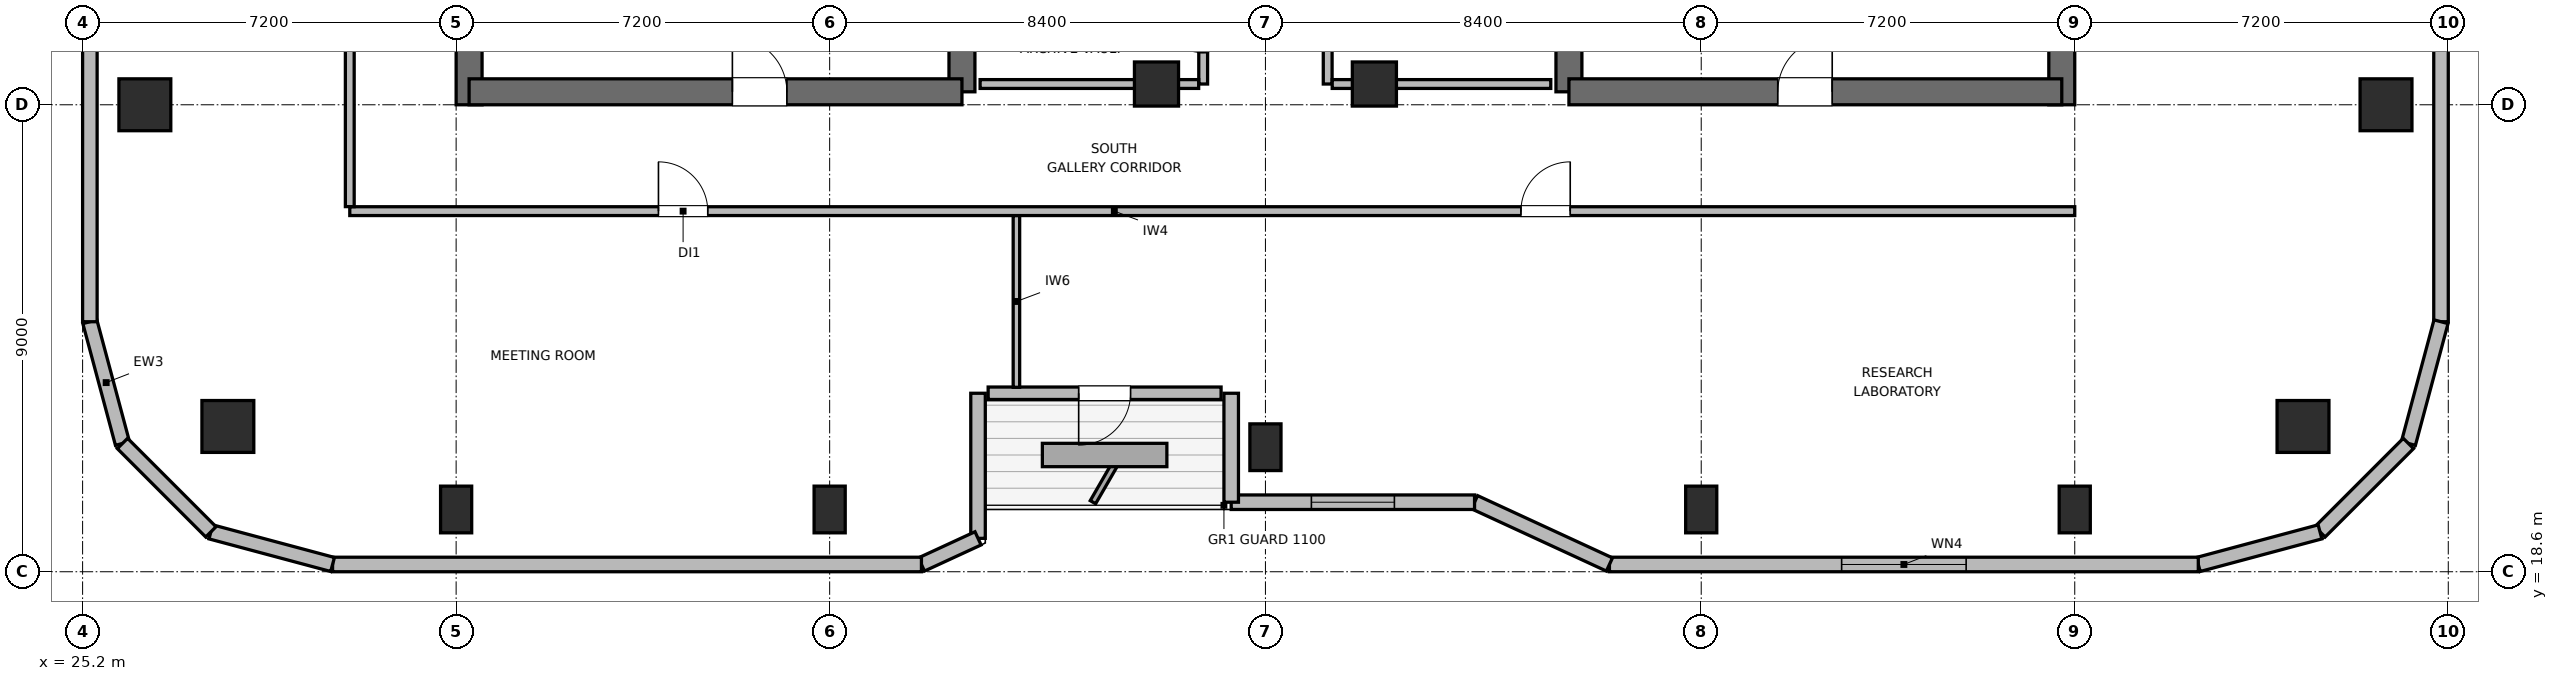
"""IFC4 building model, lengths in metres.
Left out: names, types, materials, properties, quantities, classifications, styles, units other than length and angle.
Written with IfcOpenShell. Run it as: python <this file> out.ifc"""

import sys

from ifc_helpers import new_model, si_unit, direction, frame, frame_2d, origin, origin_2d, place, context, subcontext, project, spatial, rectangle, circle, extrude, element, fill, save


model = new_model("IFC4")
c1 = context("Model", 3, precision=1e-05, world=origin(), true_north=direction((0.0, 1.0)))
c2 = subcontext(c1, "Body", "Model", "MODEL_VIEW")
j1 = project(units=[si_unit("LENGTHUNIT", "METRE"), si_unit("PLANEANGLEUNIT", "RADIAN")], contexts=[c1])
p1 = place(None, origin())
s1 = spatial("IfcSite", under=j1, at=p1, CompositionType="ELEMENT")
p2 = place(p1, origin())
s2 = spatial("IfcBuilding", under=s1, at=p2, CompositionType="ELEMENT")
p3 = place(p2, frame((0.0, 0.0, 270.6)))
s3 = spatial("IfcBuildingStorey", under=s2, at=p3, CompositionType="ELEMENT", Elevation=270.6)
p4 = place(p3, frame((32.65, 27.6, 0.0), z_axis=(0.0, 0.0, 1.0), x_axis=(0.0, 1.0, 0.0)))
e1 = element("IfcWall", 1, at=p4, inside=s3, PredefinedType="SHEAR", context=c2, shape_type="SweptSolid", body=[
    extrude(rectangle(XDim=16.8, YDim=0.5, at=frame_2d((8.4, 0.0))), origin(), (0.0, 0.0, 1.0), 3.9),
])
p5 = place(p3, frame((42.15, 27.85, 0.0), z_axis=(0.0, 0.0, 1.0), x_axis=(0.0, 1.0, 0.0)))
e2 = element("IfcWall", 2, at=p5, inside=s3, PredefinedType="SHEAR", context=c2, shape_type="SweptSolid", body=[
    extrude(rectangle(XDim=6.55, YDim=0.5, at=frame_2d((3.275, 0.0))), origin(), (0.0, 0.0, 1.0), 3.9),
])
p6 = place(p3, frame((32.65, 27.85, 0.0), z_axis=(0.0, 0.0, 1.0), x_axis=(1.0, 0.0, 0.0)))
e3 = element("IfcWall", 3, at=p6, inside=s3, PredefinedType="SHEAR", context=c2, shape_type="SweptSolid", body=[
    extrude(rectangle(XDim=9.5, YDim=0.5, at=frame_2d((4.75, 0.0))), origin(), (0.0, 0.0, 1.0), 3.9),
])
p7 = place(p6, frame((5.075, 0.0, 0.0)))
e4 = element("IfcOpeningElement", 4, at=p7, cuts=e3, PredefinedType="OPENING", context=c2, shape_type="SweptSolid", body=[
    extrude(rectangle(XDim=1.05, YDim=2.04, at=frame_2d((0.525, 1.02))), frame((0.0, 0.26, 0.0), z_axis=(0.0, -1.0, 0.0), x_axis=(1.0, 0.0, 0.0)), (0.0, 0.0, 1.0), 0.52),
])
p8 = place(p3, frame((53.85, 27.85, 0.0), z_axis=(0.0, 0.0, 1.0), x_axis=(0.0, 1.0, 0.0)))
e5 = element("IfcWall", 5, at=p8, inside=s3, PredefinedType="SHEAR", context=c2, shape_type="SweptSolid", body=[
    extrude(rectangle(XDim=7.95, YDim=0.5, at=frame_2d((3.975, 0.0))), origin(), (0.0, 0.0, 1.0), 3.9),
])
p9 = place(p3, frame((63.35, 27.6, 0.0), z_axis=(0.0, 0.0, 1.0), x_axis=(0.0, 1.0, 0.0)))
e6 = element("IfcWall", 6, at=p9, inside=s3, PredefinedType="SHEAR", context=c2, shape_type="SweptSolid", body=[
    extrude(rectangle(XDim=16.8, YDim=0.5, at=frame_2d((8.4, 0.0))), origin(), (0.0, 0.0, 1.0), 3.9),
])
p10 = place(p3, frame((53.85, 27.85, 0.0), z_axis=(0.0, 0.0, 1.0), x_axis=(1.0, 0.0, 0.0)))
e7 = element("IfcWall", 7, at=p10, inside=s3, PredefinedType="SHEAR", context=c2, shape_type="SweptSolid", body=[
    extrude(rectangle(XDim=9.5, YDim=0.5, at=frame_2d((4.75, 0.0))), origin(), (0.0, 0.0, 1.0), 3.9),
])
p11 = place(p10, frame((4.025, 0.0, 0.0)))
e8 = element("IfcOpeningElement", 8, at=p11, cuts=e7, PredefinedType="OPENING", context=c2, shape_type="SweptSolid", body=[
    extrude(rectangle(XDim=1.05, YDim=2.04, at=frame_2d((0.525, 1.02))), frame((0.0, 0.26, 0.0), z_axis=(0.0, -1.0, 0.0), x_axis=(1.0, 0.0, 0.0)), (0.0, 0.0, 1.0), 0.52),
])
for number, where, z_axis, x_axis in (
    (9, (28.0, 21.4, 0.0), (0.0, 0.0, 1.0), (1.0, 0.0, 0.0)),
    (10, (68.0, 21.4, 0.0), (0.0, 0.0, 1.0), (1.0, 0.0, 0.0)),
):
    element("IfcColumn", number, at=place(p3, frame(where, z_axis=z_axis, x_axis=x_axis)), inside=s3, PredefinedType="COLUMN", context=c2, shape_type="SweptSolid", body=[
        extrude(circle(Radius=0.5, at=origin_2d()), origin(), (0.0, 0.0, 1.0), 3.9),
    ])
for number, where, z_axis, x_axis in (
    (11, (32.4, 19.8, 0.0), (0.0, 0.0, 1.0), (1.0, 0.0, 0.0)),
    (12, (39.6, 19.8, 0.0), (0.0, 0.0, 1.0), (1.0, 0.0, 0.0)),
    (13, (48.0, 21.0, 0.0), (0.0, 0.0, 1.0), (1.0, 0.0, 0.0)),
    (14, (56.4, 19.8, 0.0), (0.0, 0.0, 1.0), (1.0, 0.0, 0.0)),
    (15, (63.6, 19.8, 0.0), (0.0, 0.0, 1.0), (1.0, 0.0, 0.0)),
):
    element("IfcColumn", number, at=place(p3, frame(where, z_axis=z_axis, x_axis=x_axis)), inside=s3, PredefinedType="COLUMN", context=c2, shape_type="SweptSolid", body=[
        extrude(rectangle(XDim=0.6, YDim=0.9, at=origin_2d()), origin(), (0.0, 0.0, 1.0), 3.9),
    ])
for number, where, z_axis, x_axis in (
    (16, (26.4, 27.6, 0.0), (0.0, 0.0, 1.0), (1.0, 0.0, 0.0)),
    (17, (69.6, 27.6, 0.0), (0.0, 0.0, 1.0), (1.0, 0.0, 0.0)),
):
    element("IfcColumn", number, at=place(p3, frame(where, z_axis=z_axis, x_axis=x_axis)), inside=s3, PredefinedType="COLUMN", context=c2, shape_type="SweptSolid", body=[
        extrude(rectangle(XDim=1.0, YDim=1.0, at=origin_2d()), origin(), (0.0, 0.0, 1.0), 3.9),
    ])
for number, where, z_axis, x_axis in (
    (18, (45.9, 28.0, 0.0), (0.0, 0.0, 1.0), (1.0, 0.0, 0.0)),
    (19, (50.1, 28.0, 0.0), (0.0, 0.0, 1.0), (1.0, 0.0, 0.0)),
):
    element("IfcColumn", number, at=place(p3, frame(where, z_axis=z_axis, x_axis=x_axis)), inside=s3, PredefinedType="COLUMN", context=c2, shape_type="SweptSolid", body=[
        extrude(rectangle(XDim=0.85, YDim=0.85, at=origin_2d()), origin(), (0.0, 0.0, 1.0), 3.9),
    ])
p12 = place(p3, frame((25.969, 21.073, 0.0), z_axis=(0.0, 0.0, 1.0), x_axis=(-0.258751159445, 0.965944013639, 0.0)))
e20 = element("IfcWall", 20, at=p12, inside=s3, PredefinedType="SOLIDWALL", context=c2, shape_type="SweptSolid", body=[
    extrude(rectangle(XDim=2.429, YDim=0.28, at=frame_2d((1.214, 0.0))), origin(), (0.0, 0.0, 1.0), 3.68),
])
p13 = place(p3, frame((25.34, 23.418, 0.0), z_axis=(0.0, 0.0, 1.0), x_axis=(0.0, 1.0, 0.0)))
e21 = element("IfcWall", 21, at=p13, inside=s3, PredefinedType="SOLIDWALL", context=c2, shape_type="SweptSolid", body=[
    extrude(rectangle(XDim=5.842, YDim=0.28, at=frame_2d((2.921, 0.0))), origin(), (0.0, 0.0, 1.0), 3.68),
])
p14 = place(p3, frame((70.66, 37.66, 0.0), z_axis=(0.0, 0.0, 1.0), x_axis=(0.0, -1.0, 0.0)))
e22 = element("IfcWall", 22, at=p14, inside=s3, PredefinedType="SOLIDWALL", context=c2, shape_type="SweptSolid", body=[
    extrude(rectangle(XDim=14.241, YDim=0.28, at=frame_2d((7.121, 0.0))), origin(), (0.0, 0.0, 1.0), 3.68),
])
p15 = place(p14, frame((6.321, 0.0, 0.85)))
e23 = element("IfcOpeningElement", 23, at=p15, cuts=e22, PredefinedType="OPENING", context=c2, shape_type="SweptSolid", body=[
    extrude(rectangle(XDim=1.6, YDim=1.0, at=frame_2d((0.8, 0.5))), frame((0.0, 0.15, 0.0), z_axis=(0.0, -1.0, 0.0), x_axis=(1.0, 0.0, 0.0)), (0.0, 0.0, 1.0), 0.3),
])
p16 = place(p3, frame((70.66, 23.418, 0.0), z_axis=(0.0, 0.0, 1.0), x_axis=(-0.258751159445, -0.965944013639, 0.0)))
e24 = element("IfcWall", 24, at=p16, inside=s3, PredefinedType="SOLIDWALL", context=c2, shape_type="SweptSolid", body=[
    extrude(rectangle(XDim=2.429, YDim=0.28, at=frame_2d((1.214, 0.0))), origin(), (0.0, 0.0, 1.0), 3.68),
])
p17 = place(p3, frame((70.031, 21.073, 0.0), z_axis=(0.0, 0.0, 1.0), x_axis=(-0.707106781187, -0.707106781187, 0.0)))
e25 = element("IfcWall", 25, at=p17, inside=s3, PredefinedType="SOLIDWALL", context=c2, shape_type="SweptSolid", body=[
    extrude(rectangle(XDim=2.41, YDim=0.28, at=frame_2d((1.205, 0.0))), origin(), (0.0, 0.0, 1.0), 3.68),
])
p18 = place(p3, frame((68.327, 19.368, 0.0), z_axis=(0.0, 0.0, 1.0), x_axis=(-0.965937282298, -0.25877628691, 0.0)))
e26 = element("IfcWall", 26, at=p18, inside=s3, PredefinedType="SOLIDWALL", context=c2, shape_type="SweptSolid", body=[
    extrude(rectangle(XDim=2.428, YDim=0.28, at=frame_2d((1.214, 0.0))), origin(), (0.0, 0.0, 1.0), 3.68),
])
p19 = place(p3, frame((65.982, 18.74, 0.0), z_axis=(0.0, 0.0, 1.0), x_axis=(-1.0, 0.0, 0.0)))
e27 = element("IfcWall", 27, at=p19, inside=s3, PredefinedType="SOLIDWALL", context=c2, shape_type="SweptSolid", body=[
    extrude(rectangle(XDim=11.351, YDim=0.28, at=frame_2d((5.676, 0.0))), origin(), (0.0, 0.0, 1.0), 3.68),
])
p20 = place(p19, frame((4.475, 0.0, 0.85)))
e28 = element("IfcOpeningElement", 28, at=p20, cuts=e27, PredefinedType="OPENING", context=c2, shape_type="SweptSolid", body=[
    extrude(rectangle(XDim=2.4, YDim=1.15, at=frame_2d((1.2, 0.575))), frame((0.0, 0.15, 0.0), z_axis=(0.0, -1.0, 0.0), x_axis=(1.0, 0.0, 0.0)), (0.0, 0.0, 1.0), 0.3),
])
p21 = place(p3, frame((54.631, 18.74, 0.0), z_axis=(0.0, 0.0, 1.0), x_axis=(-0.907956889006, 0.419063584324, 0.0)))
e29 = element("IfcWall", 29, at=p21, inside=s3, PredefinedType="SOLIDWALL", context=c2, shape_type="SweptSolid", body=[
    extrude(rectangle(XDim=2.864, YDim=0.28, at=frame_2d((1.432, 0.0))), origin(), (0.0, 0.0, 1.0), 2.265),
])
p22 = place(p3, frame((52.031, 19.94, 0.0), z_axis=(0.0, 0.0, 1.0), x_axis=(-1.0, 0.0, 0.0)))
e30 = element("IfcWall", 30, at=p22, inside=s3, PredefinedType="SOLIDWALL", context=c2, shape_type="SweptSolid", body=[
    extrude(rectangle(XDim=4.691, YDim=0.28, at=frame_2d((2.345, 0.0))), origin(), (0.0, 0.0, 1.0), 2.265),
])
p23 = place(p22, frame((1.545, 0.0, 0.85)))
e31 = element("IfcOpeningElement", 31, at=p23, cuts=e30, PredefinedType="OPENING", context=c2, shape_type="SweptSolid", body=[
    extrude(rectangle(XDim=1.6, YDim=1.0, at=frame_2d((0.8, 0.5))), frame((0.0, 0.15, 0.0), z_axis=(0.0, -1.0, 0.0), x_axis=(1.0, 0.0, 0.0)), (0.0, 0.0, 1.0), 0.3),
])
p24 = place(p3, frame((47.34, 19.94, 0.0), z_axis=(0.0, 0.0, 1.0), x_axis=(0.0, 1.0, 0.0)))
e32 = element("IfcWall", 32, at=p24, inside=s3, PredefinedType="SOLIDWALL", context=c2, shape_type="SweptSolid", body=[
    extrude(rectangle(XDim=2.1, YDim=0.28, at=frame_2d((1.05, 0.0))), origin(), (0.0, 0.0, 1.0), 2.265),
])
p25 = place(p3, frame((47.145, 22.04, 0.0), z_axis=(0.0, 0.0, 1.0), x_axis=(-1.0, 0.0, 0.0)))
e33 = element("IfcWall", 33, at=p25, inside=s3, PredefinedType="SOLIDWALL", context=c2, shape_type="SweptSolid", body=[
    extrude(rectangle(XDim=4.49, YDim=0.24, at=frame_2d((2.245, 0.0))), origin(), (0.0, 0.0, 1.0), 3.68),
])
p26 = place(p25, frame((1.745, 0.0, 0.0)))
e34 = element("IfcOpeningElement", 34, at=p26, cuts=e33, PredefinedType="OPENING", context=c2, shape_type="SweptSolid", body=[
    extrude(rectangle(XDim=1.0, YDim=2.02, at=frame_2d((0.5, 1.01))), frame((0.0, 0.13, 0.0), z_axis=(0.0, -1.0, 0.0), x_axis=(1.0, 0.0, 0.0)), (0.0, 0.0, 1.0), 0.26),
])
p27 = place(p3, frame((42.46, 22.04, 0.0), z_axis=(0.0, 0.0, 1.0), x_axis=(0.0, -1.0, 0.0)))
e35 = element("IfcWall", 35, at=p27, inside=s3, PredefinedType="SOLIDWALL", context=c2, shape_type="SweptSolid", body=[
    extrude(rectangle(XDim=2.796, YDim=0.28, at=frame_2d((1.398, 0.0))), origin(), (0.0, 0.0, 1.0), 2.265),
])
p28 = place(p3, frame((42.46, 19.244, 0.0), z_axis=(0.0, 0.0, 1.0), x_axis=(-0.907893953211, -0.419199916176, 0.0)))
e36 = element("IfcWall", 36, at=p28, inside=s3, PredefinedType="SOLIDWALL", context=c2, shape_type="SweptSolid", body=[
    extrude(rectangle(XDim=1.201, YDim=0.28, at=frame_2d((0.601, 0.0))), origin(), (0.0, 0.0, 1.0), 3.68),
])
p29 = place(p3, frame((41.369, 18.74, 0.0), z_axis=(0.0, 0.0, 1.0), x_axis=(-1.0, 0.0, 0.0)))
e37 = element("IfcWall", 37, at=p29, inside=s3, PredefinedType="SOLIDWALL", context=c2, shape_type="SweptSolid", body=[
    extrude(rectangle(XDim=11.351, YDim=0.28, at=frame_2d((5.675, 0.0))), origin(), (0.0, 0.0, 1.0), 3.68),
])
p30 = place(p3, frame((30.018, 18.74, 0.0), z_axis=(0.0, 0.0, 1.0), x_axis=(-0.965937282298, 0.25877628691, 0.0)))
e38 = element("IfcWall", 38, at=p30, inside=s3, PredefinedType="SOLIDWALL", context=c2, shape_type="SweptSolid", body=[
    extrude(rectangle(XDim=2.428, YDim=0.28, at=frame_2d((1.214, 0.0))), origin(), (0.0, 0.0, 1.0), 3.68),
])
p31 = place(p3, frame((27.673, 19.368, 0.0), z_axis=(0.0, 0.0, 1.0), x_axis=(-0.707106781187, 0.707106781187, 0.0)))
e39 = element("IfcWall", 39, at=p31, inside=s3, PredefinedType="SOLIDWALL", context=c2, shape_type="SweptSolid", body=[
    extrude(rectangle(XDim=2.41, YDim=0.28, at=frame_2d((1.205, 0.0))), origin(), (0.0, 0.0, 1.0), 3.68),
])
p32 = place(p3, frame((46.8, 28.0, 0.0), z_axis=(0.0, 0.0, 1.0), x_axis=(0.0, 1.0, 0.0)))
e40 = element("IfcWall", 40, at=p32, inside=s3, PredefinedType="PARTITIONING", context=c2, shape_type="SweptSolid", body=[
    extrude(rectangle(XDim=4.5, YDim=0.17, at=frame_2d((2.25, 0.0))), origin(), (0.0, 0.0, 1.0), 3.68),
])
p33 = place(p32, frame((0.605, 0.0, 0.0)))
e41 = element("IfcOpeningElement", 41, at=p33, cuts=e40, PredefinedType="OPENING", context=c2, shape_type="SweptSolid", body=[
    extrude(rectangle(XDim=0.9, YDim=2.02, at=frame_2d((0.45, 1.01))), frame((0.0, 0.095, 0.0), z_axis=(0.0, -1.0, 0.0), x_axis=(1.0, 0.0, 0.0)), (0.0, 0.0, 1.0), 0.19),
])
p34 = place(p32, frame((2.655, 0.0, 0.0)))
e42 = element("IfcOpeningElement", 42, at=p34, cuts=e40, PredefinedType="OPENING", context=c2, shape_type="SweptSolid", body=[
    extrude(rectangle(XDim=0.9, YDim=2.02, at=frame_2d((0.45, 1.01))), frame((0.0, 0.095, 0.0), z_axis=(0.0, -1.0, 0.0), x_axis=(1.0, 0.0, 0.0)), (0.0, 0.0, 1.0), 0.19),
])
p35 = place(p3, frame((42.5, 28.0, 0.0), z_axis=(0.0, 0.0, 1.0), x_axis=(1.0, 0.0, 0.0)))
e43 = element("IfcWall", 43, at=p35, inside=s3, PredefinedType="PARTITIONING", context=c2, shape_type="SweptSolid", body=[
    extrude(rectangle(XDim=4.213, YDim=0.17, at=frame_2d((2.106, 0.0))), origin(), (0.0, 0.0, 1.0), 2.765),
])
p36 = place(p3, frame((49.2, 28.0, 0.0), z_axis=(0.0, 0.0, 1.0), x_axis=(0.0, 1.0, 0.0)))
e44 = element("IfcWall", 44, at=p36, inside=s3, PredefinedType="PARTITIONING", context=c2, shape_type="SweptSolid", body=[
    extrude(rectangle(XDim=4.5, YDim=0.17, at=frame_2d((2.25, 0.0))), origin(), (0.0, 0.0, 1.0), 3.68),
])
p37 = place(p36, frame((0.99, 0.0, 0.0)))
e45 = element("IfcOpeningElement", 45, at=p37, cuts=e44, PredefinedType="OPENING", context=c2, shape_type="SweptSolid", body=[
    extrude(rectangle(XDim=0.9, YDim=2.02, at=frame_2d((0.45, 1.01))), frame((0.0, 0.095, 0.0), z_axis=(0.0, -1.0, 0.0), x_axis=(1.0, 0.0, 0.0)), (0.0, 0.0, 1.0), 0.19),
])
p38 = place(p36, frame((3.24, 0.0, 0.0)))
e46 = element("IfcOpeningElement", 46, at=p38, cuts=e44, PredefinedType="OPENING", context=c2, shape_type="SweptSolid", body=[
    extrude(rectangle(XDim=0.9, YDim=2.02, at=frame_2d((0.45, 1.01))), frame((0.0, 0.095, 0.0), z_axis=(0.0, -1.0, 0.0), x_axis=(1.0, 0.0, 0.0)), (0.0, 0.0, 1.0), 0.19),
])
p39 = place(p3, frame((49.287, 28.0, 0.0), z_axis=(0.0, 0.0, 1.0), x_axis=(1.0, 0.0, 0.0)))
e47 = element("IfcWall", 47, at=p39, inside=s3, PredefinedType="PARTITIONING", context=c2, shape_type="SweptSolid", body=[
    extrude(rectangle(XDim=4.213, YDim=0.17, at=frame_2d((2.106, 0.0))), origin(), (0.0, 0.0, 1.0), 2.765),
])
p40 = place(p3, frame((30.35, 25.55, 0.0), z_axis=(0.0, 0.0, 1.0), x_axis=(1.0, 0.0, 0.0)))
e48 = element("IfcWall", 48, at=p40, inside=s3, PredefinedType="PARTITIONING", context=c2, shape_type="SweptSolid", body=[
    extrude(rectangle(XDim=33.25, YDim=0.17, at=frame_2d((16.625, 0.0))), origin(), (0.0, 0.0, 1.0), 3.68),
])
p41 = place(p40, frame((5.95, 0.0, 0.0)))
e49 = element("IfcOpeningElement", 49, at=p41, cuts=e48, PredefinedType="OPENING", context=c2, shape_type="SweptSolid", body=[
    extrude(rectangle(XDim=0.95, YDim=2.04, at=frame_2d((0.475, 1.02))), frame((0.0, 0.095, 0.0), z_axis=(0.0, -1.0, 0.0), x_axis=(1.0, 0.0, 0.0)), (0.0, 0.0, 1.0), 0.19),
])
p42 = place(p40, frame((22.575, 0.0, 0.0)))
e50 = element("IfcOpeningElement", 50, at=p42, cuts=e48, PredefinedType="OPENING", context=c2, shape_type="SweptSolid", body=[
    extrude(rectangle(XDim=0.95, YDim=2.04, at=frame_2d((0.475, 1.02))), frame((0.0, 0.095, 0.0), z_axis=(0.0, -1.0, 0.0), x_axis=(1.0, 0.0, 0.0)), (0.0, 0.0, 1.0), 0.19),
])
p43 = place(p3, frame((30.35, 25.637, 0.0), z_axis=(0.0, 0.0, 1.0), x_axis=(0.0, 1.0, 0.0)))
e51 = element("IfcWall", 51, at=p43, inside=s3, PredefinedType="PARTITIONING", context=c2, shape_type="SweptSolid", body=[
    extrude(rectangle(XDim=20.726, YDim=0.17, at=frame_2d((10.363, 0.0))), origin(), (0.0, 0.0, 1.0), 3.68),
])
p44 = place(p43, frame((9.888, 0.0, 0.0)))
e52 = element("IfcOpeningElement", 52, at=p44, cuts=e51, PredefinedType="OPENING", context=c2, shape_type="SweptSolid", body=[
    extrude(rectangle(XDim=0.95, YDim=2.04, at=frame_2d((0.475, 1.02))), frame((0.0, 0.095, 0.0), z_axis=(0.0, -1.0, 0.0), x_axis=(1.0, 0.0, 0.0)), (0.0, 0.0, 1.0), 0.19),
])
p45 = place(p3, frame((43.2, 22.155, 0.0), z_axis=(0.0, 0.0, 1.0), x_axis=(0.0, 1.0, 0.0)))
e53 = element("IfcWall", 53, at=p45, inside=s3, PredefinedType="PARTITIONING", context=c2, shape_type="SweptSolid", body=[
    extrude(rectangle(XDim=3.308, YDim=0.125, at=frame_2d((1.654, 0.0))), origin(), (0.0, 0.0, 1.0), 3.043),
])
p46 = place(p20, origin())
e54 = element("IfcWindow", 54, at=p46, inside=s3, PartitioningType="SINGLE_PANEL", PredefinedType="WINDOW", context=c2, shape_type="SweptSolid", body=[
    extrude(rectangle(XDim=2.4, YDim=1.15, at=frame_2d((1.2, 0.575))), frame((0.0, 0.03, 0.0), z_axis=(0.0, -1.0, 0.0), x_axis=(1.0, 0.0, 0.0)), (0.0, 0.0, 1.0), 0.06),
])
fill(e28, e54)
p47 = place(p23, origin())
e55 = element("IfcWindow", 55, at=p47, inside=s3, PartitioningType="SINGLE_PANEL", PredefinedType="WINDOW", context=c2, shape_type="SweptSolid", body=[
    extrude(rectangle(XDim=1.6, YDim=1.0, at=frame_2d((0.8, 0.5))), frame((0.0, 0.03, 0.0), z_axis=(0.0, -1.0, 0.0), x_axis=(1.0, 0.0, 0.0)), (0.0, 0.0, 1.0), 0.06),
])
fill(e31, e55)
p48 = place(p26, origin())
e56 = element("IfcDoor", 56, at=p48, inside=s3, OperationType="SINGLE_SWING_RIGHT", PredefinedType="DOOR", context=c2, shape_type="SweptSolid", body=[
    extrude(rectangle(XDim=1.0, YDim=2.02, at=frame_2d((0.5, 1.01))), frame((0.0, 0.025, 0.0), z_axis=(0.0, -1.0, 0.0), x_axis=(1.0, 0.0, 0.0)), (0.0, 0.0, 1.0), 0.05),
])
fill(e34, e56)
p49 = place(p7, origin())
e57 = element("IfcDoor", 57, at=p49, inside=s3, OperationType="SINGLE_SWING_LEFT", PredefinedType="DOOR", context=c2, shape_type="SweptSolid", body=[
    extrude(rectangle(XDim=1.05, YDim=2.04, at=frame_2d((0.525, 1.02))), frame((0.0, 0.025, 0.0), z_axis=(0.0, -1.0, 0.0), x_axis=(1.0, 0.0, 0.0)), (0.0, 0.0, 1.0), 0.05),
])
fill(e4, e57)
p50 = place(p11, origin())
e58 = element("IfcDoor", 58, at=p50, inside=s3, OperationType="SINGLE_SWING_RIGHT", PredefinedType="DOOR", context=c2, shape_type="SweptSolid", body=[
    extrude(rectangle(XDim=1.05, YDim=2.04, at=frame_2d((0.525, 1.02))), frame((0.0, 0.025, 0.0), z_axis=(0.0, -1.0, 0.0), x_axis=(1.0, 0.0, 0.0)), (0.0, 0.0, 1.0), 0.05),
])
fill(e8, e58)
p51 = place(p41, origin())
e59 = element("IfcDoor", 59, at=p51, inside=s3, OperationType="SINGLE_SWING_LEFT", PredefinedType="DOOR", context=c2, shape_type="SweptSolid", body=[
    extrude(rectangle(XDim=0.95, YDim=2.04, at=frame_2d((0.475, 1.02))), frame((0.0, 0.025, 0.0), z_axis=(0.0, -1.0, 0.0), x_axis=(1.0, 0.0, 0.0)), (0.0, 0.0, 1.0), 0.05),
])
fill(e49, e59)
p52 = place(p42, origin())
e60 = element("IfcDoor", 60, at=p52, inside=s3, OperationType="SINGLE_SWING_RIGHT", PredefinedType="DOOR", context=c2, shape_type="SweptSolid", body=[
    extrude(rectangle(XDim=0.95, YDim=2.04, at=frame_2d((0.475, 1.02))), frame((0.0, 0.025, 0.0), z_axis=(0.0, -1.0, 0.0), x_axis=(1.0, 0.0, 0.0)), (0.0, 0.0, 1.0), 0.05),
])
fill(e50, e60)
save(model, sys.argv[1])
